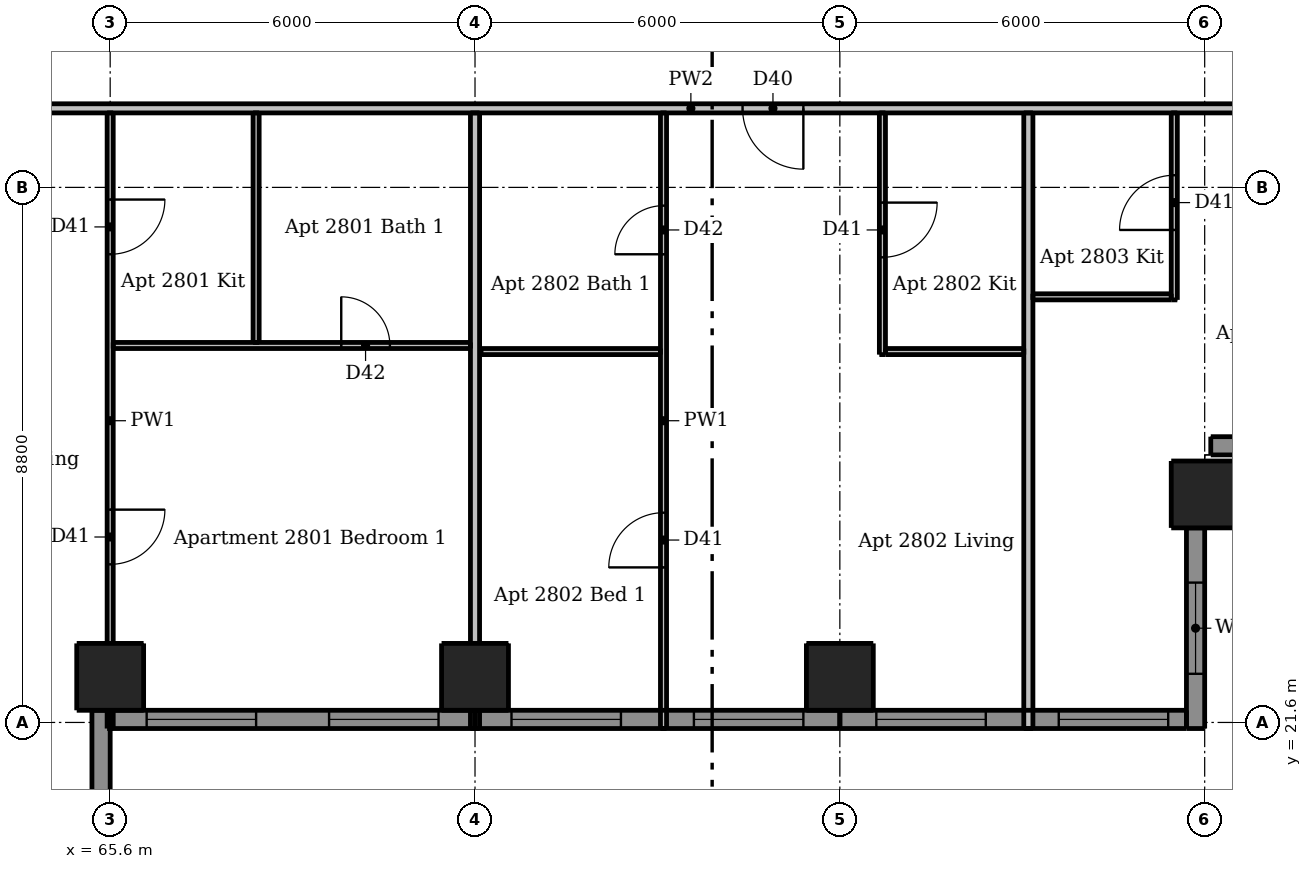
"""IFC4 building model, lengths in metres.
Left out: names, types, materials, properties, quantities, classifications, styles, units other than length and angle.
Written with IfcOpenShell. Run it as: python <this file> out.ifc"""

import sys

from ifc_helpers import new_model, si_unit, direction, frame, frame_2d, origin, origin_2d, place, context, subcontext, project, spatial, rectangle, extrude, element, fill, save


model = new_model("IFC4")
c1 = context("Model", 3, precision=1e-05, world=origin(), true_north=direction((0.0, 1.0)))
c2 = subcontext(c1, "Body", "Model", "MODEL_VIEW")
j1 = project(units=[si_unit("LENGTHUNIT", "METRE"), si_unit("PLANEANGLEUNIT", "RADIAN")], contexts=[c1])
p1 = place(None, origin())
s1 = spatial("IfcSite", under=j1, at=p1, CompositionType="ELEMENT")
p2 = place(p1, origin())
s2 = spatial("IfcBuilding", under=s1, at=p2, CompositionType="ELEMENT")
p3 = place(p2, frame((0.0, 0.0, 105.1)))
s3 = spatial("IfcBuildingStorey", under=s2, at=p3, CompositionType="ELEMENT", Elevation=105.1)
p4 = place(p3, frame((65.6, 22.35, 0.0), z_axis=(0.0, 0.0, 1.0), x_axis=(1.0, 0.0, 0.0)))
e1 = element("IfcColumn", 1, at=p4, inside=s3, PredefinedType="COLUMN", context=c2, shape_type="SweptSolid", body=[
    extrude(rectangle(XDim=1.1, YDim=1.1, at=origin_2d()), origin(), (0.0, 0.0, 1.0), 3.05),
])
for number, where, z_axis, x_axis in (
    (2, (71.6, 22.35, 0.0), (0.0, 0.0, 1.0), (1.0, 0.0, 0.0)),
    (3, (77.6, 22.35, 0.0), (0.0, 0.0, 1.0), (1.0, 0.0, 0.0)),
):
    element("IfcColumn", number, at=place(p3, frame(where, z_axis=z_axis, x_axis=x_axis)), inside=s3, PredefinedType="COLUMN", context=c2, shape_type="SweptSolid", body=[
        extrude(rectangle(XDim=1.1, YDim=1.1, at=origin_2d()), origin(), (0.0, 0.0, 1.0), 3.3),
    ])
p5 = place(p3, frame((83.6, 25.35, 0.0), z_axis=(0.0, 0.0, 1.0), x_axis=(1.0, 0.0, 0.0)))
e4 = element("IfcColumn", 4, at=p5, inside=s3, PredefinedType="COLUMN", context=c2, shape_type="SweptSolid", body=[
    extrude(rectangle(XDim=1.1, YDim=1.1, at=origin_2d()), origin(), (0.0, 0.0, 1.0), 3.05),
])
p6 = place(p3, frame((65.45, 20.0, 0.0), z_axis=(0.0, 0.0, 1.0), x_axis=(0.0, 1.0, 0.0)))
e5 = element("IfcWall", 5, at=p6, inside=s3, PredefinedType="SOLIDWALL", context=c2, shape_type="SweptSolid", body=[
    extrude(rectangle(XDim=1.8, YDim=0.3, at=frame_2d((0.9, 0.0))), origin(), (0.0, 0.0, 1.0), 3.05),
])
p7 = place(p3, frame((83.45, 21.5, 0.0), z_axis=(0.0, 0.0, 1.0), x_axis=(0.0, 1.0, 0.0)))
e6 = element("IfcWall", 6, at=p7, inside=s3, PredefinedType="SOLIDWALL", context=c2, shape_type="SweptSolid", body=[
    extrude(rectangle(XDim=3.3, YDim=0.3, at=frame_2d((1.65, 0.0))), origin(), (0.0, 0.0, 1.0), 3.05),
])
p8 = place(p7, frame((0.9, 0.0, 0.9)))
e7 = element("IfcOpeningElement", 7, at=p8, cuts=e6, PredefinedType="OPENING", context=c2, shape_type="SweptSolid", body=[
    extrude(rectangle(XDim=1.5, YDim=1.5, at=frame_2d((0.75, 0.75))), frame((0.0, 0.16, 0.0), z_axis=(0.0, -1.0, 0.0), x_axis=(1.0, 0.0, 0.0)), (0.0, 0.0, 1.0), 0.32),
])
p9 = place(p3, frame((65.6, 21.65, 0.0), z_axis=(0.0, 0.0, 1.0), x_axis=(1.0, 0.0, 0.0)))
e8 = element("IfcWall", 8, at=p9, inside=s3, PredefinedType="SOLIDWALL", context=c2, shape_type="SweptSolid", body=[
    extrude(rectangle(XDim=6.0, YDim=0.3, at=frame_2d((3.0, 0.0))), origin(), (0.0, 0.0, 1.0), 3.05),
])
p10 = place(p9, frame((0.6, 0.0, 0.15)))
e9 = element("IfcOpeningElement", 9, at=p10, cuts=e8, PredefinedType="OPENING", context=c2, shape_type="SweptSolid", body=[
    extrude(rectangle(XDim=1.8, YDim=2.1, at=frame_2d((0.9, 1.05))), frame((0.0, 0.16, 0.0), z_axis=(0.0, -1.0, 0.0), x_axis=(1.0, 0.0, 0.0)), (0.0, 0.0, 1.0), 0.32),
])
p11 = place(p9, frame((3.6, 0.0, 0.15)))
e10 = element("IfcOpeningElement", 10, at=p11, cuts=e8, PredefinedType="OPENING", context=c2, shape_type="SweptSolid", body=[
    extrude(rectangle(XDim=1.8, YDim=2.1, at=frame_2d((0.9, 1.05))), frame((0.0, 0.16, 0.0), z_axis=(0.0, -1.0, 0.0), x_axis=(1.0, 0.0, 0.0)), (0.0, 0.0, 1.0), 0.32),
])
p12 = place(p3, frame((71.6, 21.65, 0.0), z_axis=(0.0, 0.0, 1.0), x_axis=(1.0, 0.0, 0.0)))
e11 = element("IfcWall", 11, at=p12, inside=s3, PredefinedType="SOLIDWALL", context=c2, shape_type="SweptSolid", body=[
    extrude(rectangle(XDim=6.0, YDim=0.3, at=frame_2d((3.0, 0.0))), origin(), (0.0, 0.0, 1.0), 3.05),
])
p13 = place(p12, frame((0.6, 0.0, 0.15)))
e12 = element("IfcOpeningElement", 12, at=p13, cuts=e11, PredefinedType="OPENING", context=c2, shape_type="SweptSolid", body=[
    extrude(rectangle(XDim=1.8, YDim=2.1, at=frame_2d((0.9, 1.05))), frame((0.0, 0.16, 0.0), z_axis=(0.0, -1.0, 0.0), x_axis=(1.0, 0.0, 0.0)), (0.0, 0.0, 1.0), 0.32),
])
p14 = place(p12, frame((3.6, 0.0, 0.15)))
e13 = element("IfcOpeningElement", 13, at=p14, cuts=e11, PredefinedType="OPENING", context=c2, shape_type="SweptSolid", body=[
    extrude(rectangle(XDim=1.8, YDim=2.1, at=frame_2d((0.9, 1.05))), frame((0.0, 0.16, 0.0), z_axis=(0.0, -1.0, 0.0), x_axis=(1.0, 0.0, 0.0)), (0.0, 0.0, 1.0), 0.32),
])
p15 = place(p3, frame((77.6, 21.65, 0.0), z_axis=(0.0, 0.0, 1.0), x_axis=(1.0, 0.0, 0.0)))
e14 = element("IfcWall", 14, at=p15, inside=s3, PredefinedType="SOLIDWALL", context=c2, shape_type="SweptSolid", body=[
    extrude(rectangle(XDim=5.7, YDim=0.3, at=frame_2d((2.85, 0.0))), origin(), (0.0, 0.0, 1.0), 3.05),
])
p16 = place(p15, frame((0.6, 0.0, 0.15)))
e15 = element("IfcOpeningElement", 15, at=p16, cuts=e14, PredefinedType="OPENING", context=c2, shape_type="SweptSolid", body=[
    extrude(rectangle(XDim=1.8, YDim=2.1, at=frame_2d((0.9, 1.05))), frame((0.0, 0.16, 0.0), z_axis=(0.0, -1.0, 0.0), x_axis=(1.0, 0.0, 0.0)), (0.0, 0.0, 1.0), 0.32),
])
p17 = place(p15, frame((3.6, 0.0, 0.15)))
e16 = element("IfcOpeningElement", 16, at=p17, cuts=e14, PredefinedType="OPENING", context=c2, shape_type="SweptSolid", body=[
    extrude(rectangle(XDim=1.8, YDim=2.1, at=frame_2d((0.9, 1.05))), frame((0.0, 0.16, 0.0), z_axis=(0.0, -1.0, 0.0), x_axis=(1.0, 0.0, 0.0)), (0.0, 0.0, 1.0), 0.32),
])
p18 = place(p3, frame((83.7, 26.15, 0.0), z_axis=(0.0, 0.0, 1.0), x_axis=(1.0, 0.0, 0.0)))
e17 = element("IfcWall", 17, at=p18, inside=s3, PredefinedType="SOLIDWALL", context=c2, shape_type="SweptSolid", body=[
    extrude(rectangle(XDim=5.79, YDim=0.3, at=frame_2d((2.895, 0.0))), origin(), (0.0, 0.0, 1.0), 3.05),
])
p19 = place(p18, frame((0.5, 0.0, 0.15)))
e18 = element("IfcOpeningElement", 18, at=p19, cuts=e17, PredefinedType="OPENING", context=c2, shape_type="SweptSolid", body=[
    extrude(rectangle(XDim=1.8, YDim=2.1, at=frame_2d((0.9, 1.05))), frame((0.0, 0.16, 0.0), z_axis=(0.0, -1.0, 0.0), x_axis=(1.0, 0.0, 0.0)), (0.0, 0.0, 1.0), 0.32),
])
p20 = place(p18, frame((3.5, 0.0, 0.15)))
e19 = element("IfcOpeningElement", 19, at=p20, cuts=e17, PredefinedType="OPENING", context=c2, shape_type="SweptSolid", body=[
    extrude(rectangle(XDim=1.8, YDim=2.1, at=frame_2d((0.9, 1.05))), frame((0.0, 0.16, 0.0), z_axis=(0.0, -1.0, 0.0), x_axis=(1.0, 0.0, 0.0)), (0.0, 0.0, 1.0), 0.32),
])
p21 = place(p3, frame((65.6, 31.625, 0.0), z_axis=(0.0, 0.0, 1.0), x_axis=(0.0, -1.0, 0.0)))
e20 = element("IfcWall", 20, at=p21, inside=s3, PredefinedType="PARTITIONING", context=c2, shape_type="SweptSolid", body=[
    extrude(rectangle(XDim=10.125, YDim=0.1, at=frame_2d((5.062, 0.0))), origin(), (0.0, 0.0, 1.0), 2.516),
])
p22 = place(p21, frame((1.425, 0.0, 0.0)))
e21 = element("IfcOpeningElement", 21, at=p22, cuts=e20, PredefinedType="OPENING", context=c2, shape_type="SweptSolid", body=[
    extrude(rectangle(XDim=0.9, YDim=2.1, at=frame_2d((0.45, 1.05))), frame((0.0, 0.06, 0.0), z_axis=(0.0, -1.0, 0.0), x_axis=(1.0, 0.0, 0.0)), (0.0, 0.0, 1.0), 0.12),
])
p23 = place(p21, frame((6.525, 0.0, 0.0)))
e22 = element("IfcOpeningElement", 22, at=p23, cuts=e20, PredefinedType="OPENING", context=c2, shape_type="SweptSolid", body=[
    extrude(rectangle(XDim=0.9, YDim=2.1, at=frame_2d((0.45, 1.05))), frame((0.0, 0.06, 0.0), z_axis=(0.0, -1.0, 0.0), x_axis=(1.0, 0.0, 0.0)), (0.0, 0.0, 1.0), 0.12),
])
p24 = place(p3, frame((68.0, 27.85, 0.0), z_axis=(0.0, 0.0, 1.0), x_axis=(0.0, 1.0, 0.0)))
e23 = element("IfcWall", 23, at=p24, inside=s3, PredefinedType="PARTITIONING", context=c2, shape_type="SweptSolid", body=[
    extrude(rectangle(XDim=3.775, YDim=0.1, at=frame_2d((1.887, 0.0))), origin(), (0.0, 0.0, 1.0), 3.05),
])
p25 = place(p3, frame((74.7, 21.5, 0.0), z_axis=(0.0, 0.0, 1.0), x_axis=(0.0, 1.0, 0.0)))
e24 = element("IfcWall", 24, at=p25, inside=s3, PredefinedType="PARTITIONING", context=c2, shape_type="SweptSolid", body=[
    extrude(rectangle(XDim=10.125, YDim=0.1, at=frame_2d((5.062, 0.0))), origin(), (0.0, 0.0, 1.0), 3.05),
])
p26 = place(p25, frame((2.65, 0.0, 0.0)))
e25 = element("IfcOpeningElement", 25, at=p26, cuts=e24, PredefinedType="OPENING", context=c2, shape_type="SweptSolid", body=[
    extrude(rectangle(XDim=0.9, YDim=2.1, at=frame_2d((0.45, 1.05))), frame((0.0, 0.06, 0.0), z_axis=(0.0, -1.0, 0.0), x_axis=(1.0, 0.0, 0.0)), (0.0, 0.0, 1.0), 0.12),
])
p27 = place(p25, frame((7.8, 0.0, 0.0)))
e26 = element("IfcOpeningElement", 26, at=p27, cuts=e24, PredefinedType="OPENING", context=c2, shape_type="SweptSolid", body=[
    extrude(rectangle(XDim=0.8, YDim=2.1, at=frame_2d((0.4, 1.05))), frame((0.0, 0.06, 0.0), z_axis=(0.0, -1.0, 0.0), x_axis=(1.0, 0.0, 0.0)), (0.0, 0.0, 1.0), 0.12),
])
p28 = place(p3, frame((78.3, 31.625, 0.0), z_axis=(0.0, 0.0, 1.0), x_axis=(0.0, -1.0, 0.0)))
e27 = element("IfcWall", 27, at=p28, inside=s3, PredefinedType="PARTITIONING", context=c2, shape_type="SweptSolid", body=[
    extrude(rectangle(XDim=3.975, YDim=0.1, at=frame_2d((1.988, 0.0))), origin(), (0.0, 0.0, 1.0), 3.05),
])
p29 = place(p28, frame((1.475, 0.0, 0.0)))
e28 = element("IfcOpeningElement", 28, at=p29, cuts=e27, PredefinedType="OPENING", context=c2, shape_type="SweptSolid", body=[
    extrude(rectangle(XDim=0.9, YDim=2.1, at=frame_2d((0.45, 1.05))), frame((0.0, 0.06, 0.0), z_axis=(0.0, -1.0, 0.0), x_axis=(1.0, 0.0, 0.0)), (0.0, 0.0, 1.0), 0.12),
])
p30 = place(p3, frame((83.1, 28.55, 0.0), z_axis=(0.0, 0.0, 1.0), x_axis=(0.0, 1.0, 0.0)))
e29 = element("IfcWall", 29, at=p30, inside=s3, PredefinedType="PARTITIONING", context=c2, shape_type="SweptSolid", body=[
    extrude(rectangle(XDim=3.075, YDim=0.1, at=frame_2d((1.538, 0.0))), origin(), (0.0, 0.0, 1.0), 3.05),
])
p31 = place(p30, frame((1.15, 0.0, 0.0)))
e30 = element("IfcOpeningElement", 30, at=p31, cuts=e29, PredefinedType="OPENING", context=c2, shape_type="SweptSolid", body=[
    extrude(rectangle(XDim=0.9, YDim=2.1, at=frame_2d((0.45, 1.05))), frame((0.0, 0.06, 0.0), z_axis=(0.0, -1.0, 0.0), x_axis=(1.0, 0.0, 0.0)), (0.0, 0.0, 1.0), 0.12),
])
p32 = place(p3, frame((80.775, 28.6, 0.0), z_axis=(0.0, 0.0, 1.0), x_axis=(1.0, 0.0, 0.0)))
e31 = element("IfcWall", 31, at=p32, inside=s3, PredefinedType="PARTITIONING", context=c2, shape_type="SweptSolid", body=[
    extrude(rectangle(XDim=2.275, YDim=0.1, at=frame_2d((1.138, 0.0))), origin(), (0.0, 0.0, 1.0), 3.05),
])
p33 = place(p3, frame((65.65, 27.8, 0.0), z_axis=(0.0, 0.0, 1.0), x_axis=(1.0, 0.0, 0.0)))
e32 = element("IfcWall", 32, at=p33, inside=s3, PredefinedType="PARTITIONING", context=c2, shape_type="SweptSolid", body=[
    extrude(rectangle(XDim=5.875, YDim=0.1, at=frame_2d((2.938, 0.0))), origin(), (0.0, 0.0, 1.0), 3.05),
])
p34 = place(p33, frame((3.75, 0.0, 0.0)))
e33 = element("IfcOpeningElement", 33, at=p34, cuts=e32, PredefinedType="OPENING", context=c2, shape_type="SweptSolid", body=[
    extrude(rectangle(XDim=0.8, YDim=2.1, at=frame_2d((0.4, 1.05))), frame((0.0, 0.06, 0.0), z_axis=(0.0, -1.0, 0.0), x_axis=(1.0, 0.0, 0.0)), (0.0, 0.0, 1.0), 0.12),
])
p35 = place(p3, frame((71.7, 27.7, 0.0), z_axis=(0.0, 0.0, 1.0), x_axis=(1.0, 0.0, 0.0)))
e34 = element("IfcWall", 34, at=p35, inside=s3, PredefinedType="PARTITIONING", context=c2, shape_type="SweptSolid", body=[
    extrude(rectangle(XDim=2.95, YDim=0.1, at=frame_2d((1.475, 0.0))), origin(), (0.0, 0.0, 1.0), 3.05),
])
p36 = place(p3, frame((78.35, 27.7, 0.0), z_axis=(0.0, 0.0, 1.0), x_axis=(1.0, 0.0, 0.0)))
e35 = element("IfcWall", 35, at=p36, inside=s3, PredefinedType="PARTITIONING", context=c2, shape_type="SweptSolid", body=[
    extrude(rectangle(XDim=2.275, YDim=0.1, at=frame_2d((1.137, 0.0))), origin(), (0.0, 0.0, 1.0), 3.05),
])
p37 = place(p3, frame((71.6, 21.5, 0.0), z_axis=(0.0, 0.0, 1.0), x_axis=(0.0, 1.0, 0.0)))
e36 = element("IfcWall", 36, at=p37, inside=s3, PredefinedType="PARTITIONING", context=c2, shape_type="SweptSolid", body=[
    extrude(rectangle(XDim=10.125, YDim=0.15, at=frame_2d((5.062, 0.0))), origin(), (0.0, 0.0, 1.0), 2.516),
])
p38 = place(p3, frame((80.7, 21.5, 0.0), z_axis=(0.0, 0.0, 1.0), x_axis=(0.0, 1.0, 0.0)))
e37 = element("IfcWall", 37, at=p38, inside=s3, PredefinedType="PARTITIONING", context=c2, shape_type="SweptSolid", body=[
    extrude(rectangle(XDim=10.125, YDim=0.15, at=frame_2d((5.062, 0.0))), origin(), (0.0, 0.0, 1.0), 3.05),
])
p39 = place(p3, frame((89.525, 31.7, 0.0), z_axis=(0.0, 0.0, 1.0), x_axis=(-1.0, 0.0, 0.0)))
e38 = element("IfcWall", 38, at=p39, inside=s3, PredefinedType="PARTITIONING", context=c2, shape_type="SweptSolid", body=[
    extrude(rectangle(XDim=28.75, YDim=0.15, at=frame_2d((14.375, 0.0))), origin(), (0.0, 0.0, 1.0), 3.05),
])
p40 = place(p39, frame((25.875, 0.0, 0.0)))
e39 = element("IfcOpeningElement", 39, at=p40, cuts=e38, PredefinedType="OPENING", context=c2, shape_type="SweptSolid", body=[
    extrude(rectangle(XDim=1.0, YDim=2.1, at=frame_2d((0.5, 1.05))), frame((0.0, 0.085, 0.0), z_axis=(0.0, -1.0, 0.0), x_axis=(1.0, 0.0, 0.0)), (0.0, 0.0, 1.0), 0.17),
])
p41 = place(p39, frame((12.525, 0.0, 0.0)))
e40 = element("IfcOpeningElement", 40, at=p41, cuts=e38, PredefinedType="OPENING", context=c2, shape_type="SweptSolid", body=[
    extrude(rectangle(XDim=1.0, YDim=2.1, at=frame_2d((0.5, 1.05))), frame((0.0, 0.085, 0.0), z_axis=(0.0, -1.0, 0.0), x_axis=(1.0, 0.0, 0.0)), (0.0, 0.0, 1.0), 0.17),
])
p42 = place(p39, frame((4.175, 0.0, 0.0)))
e41 = element("IfcOpeningElement", 41, at=p42, cuts=e38, PredefinedType="OPENING", context=c2, shape_type="SweptSolid", body=[
    extrude(rectangle(XDim=1.0, YDim=2.1, at=frame_2d((0.5, 1.05))), frame((0.0, 0.085, 0.0), z_axis=(0.0, -1.0, 0.0), x_axis=(1.0, 0.0, 0.0)), (0.0, 0.0, 1.0), 0.17),
])
p43 = place(p8, origin())
e42 = element("IfcWindow", 42, at=p43, inside=s3, PartitioningType="DOUBLE_PANEL_VERTICAL", PredefinedType="WINDOW", context=c2, shape_type="SweptSolid", body=[
    extrude(rectangle(XDim=1.5, YDim=1.5, at=frame_2d((0.75, 0.75))), frame((0.0, 0.03, 0.0), z_axis=(0.0, -1.0, 0.0), x_axis=(1.0, 0.0, 0.0)), (0.0, 0.0, 1.0), 0.06),
])
fill(e7, e42)
p44 = place(p10, origin())
e43 = element("IfcWindow", 43, at=p44, inside=s3, PartitioningType="DOUBLE_PANEL_VERTICAL", PredefinedType="WINDOW", context=c2, shape_type="SweptSolid", body=[
    extrude(rectangle(XDim=1.8, YDim=2.1, at=frame_2d((0.9, 1.05))), frame((0.0, 0.03, 0.0), z_axis=(0.0, -1.0, 0.0), x_axis=(1.0, 0.0, 0.0)), (0.0, 0.0, 1.0), 0.06),
])
fill(e9, e43)
p45 = place(p11, origin())
e44 = element("IfcWindow", 44, at=p45, inside=s3, PartitioningType="DOUBLE_PANEL_VERTICAL", PredefinedType="WINDOW", context=c2, shape_type="SweptSolid", body=[
    extrude(rectangle(XDim=1.8, YDim=2.1, at=frame_2d((0.9, 1.05))), frame((0.0, 0.03, 0.0), z_axis=(0.0, -1.0, 0.0), x_axis=(1.0, 0.0, 0.0)), (0.0, 0.0, 1.0), 0.06),
])
fill(e10, e44)
p46 = place(p13, origin())
e45 = element("IfcWindow", 45, at=p46, inside=s3, PartitioningType="DOUBLE_PANEL_VERTICAL", PredefinedType="WINDOW", context=c2, shape_type="SweptSolid", body=[
    extrude(rectangle(XDim=1.8, YDim=2.1, at=frame_2d((0.9, 1.05))), frame((0.0, 0.03, 0.0), z_axis=(0.0, -1.0, 0.0), x_axis=(1.0, 0.0, 0.0)), (0.0, 0.0, 1.0), 0.06),
])
fill(e12, e45)
p47 = place(p14, origin())
e46 = element("IfcWindow", 46, at=p47, inside=s3, PartitioningType="DOUBLE_PANEL_VERTICAL", PredefinedType="WINDOW", context=c2, shape_type="SweptSolid", body=[
    extrude(rectangle(XDim=1.8, YDim=2.1, at=frame_2d((0.9, 1.05))), frame((0.0, 0.03, 0.0), z_axis=(0.0, -1.0, 0.0), x_axis=(1.0, 0.0, 0.0)), (0.0, 0.0, 1.0), 0.06),
])
fill(e13, e46)
p48 = place(p16, origin())
e47 = element("IfcWindow", 47, at=p48, inside=s3, PartitioningType="DOUBLE_PANEL_VERTICAL", PredefinedType="WINDOW", context=c2, shape_type="SweptSolid", body=[
    extrude(rectangle(XDim=1.8, YDim=2.1, at=frame_2d((0.9, 1.05))), frame((0.0, 0.03, 0.0), z_axis=(0.0, -1.0, 0.0), x_axis=(1.0, 0.0, 0.0)), (0.0, 0.0, 1.0), 0.06),
])
fill(e15, e47)
p49 = place(p17, origin())
e48 = element("IfcWindow", 48, at=p49, inside=s3, PartitioningType="DOUBLE_PANEL_VERTICAL", PredefinedType="WINDOW", context=c2, shape_type="SweptSolid", body=[
    extrude(rectangle(XDim=1.8, YDim=2.1, at=frame_2d((0.9, 1.05))), frame((0.0, 0.03, 0.0), z_axis=(0.0, -1.0, 0.0), x_axis=(1.0, 0.0, 0.0)), (0.0, 0.0, 1.0), 0.06),
])
fill(e16, e48)
p50 = place(p22, origin())
e49 = element("IfcDoor", 49, at=p50, inside=s3, OperationType="SINGLE_SWING_LEFT", PredefinedType="DOOR", context=c2, shape_type="SweptSolid", body=[
    extrude(rectangle(XDim=0.9, YDim=2.1, at=frame_2d((0.45, 1.05))), frame((0.0, 0.025, 0.0), z_axis=(0.0, -1.0, 0.0), x_axis=(1.0, 0.0, 0.0)), (0.0, 0.0, 1.0), 0.05),
])
fill(e21, e49)
p51 = place(p23, origin())
e50 = element("IfcDoor", 50, at=p51, inside=s3, OperationType="SINGLE_SWING_LEFT", PredefinedType="DOOR", context=c2, shape_type="SweptSolid", body=[
    extrude(rectangle(XDim=0.9, YDim=2.1, at=frame_2d((0.45, 1.05))), frame((0.0, 0.025, 0.0), z_axis=(0.0, -1.0, 0.0), x_axis=(1.0, 0.0, 0.0)), (0.0, 0.0, 1.0), 0.05),
])
fill(e22, e50)
p52 = place(p34, origin())
e51 = element("IfcDoor", 51, at=p52, inside=s3, OperationType="SINGLE_SWING_LEFT", PredefinedType="DOOR", context=c2, shape_type="SweptSolid", body=[
    extrude(rectangle(XDim=0.8, YDim=2.1, at=frame_2d((0.4, 1.05))), frame((0.0, 0.025, 0.0), z_axis=(0.0, -1.0, 0.0), x_axis=(1.0, 0.0, 0.0)), (0.0, 0.0, 1.0), 0.05),
])
fill(e33, e51)
p53 = place(p41, origin())
e52 = element("IfcDoor", 52, at=p53, inside=s3, OperationType="SINGLE_SWING_LEFT", PredefinedType="DOOR", context=c2, shape_type="SweptSolid", body=[
    extrude(rectangle(XDim=1.0, YDim=2.1, at=frame_2d((0.5, 1.05))), frame((0.0, 0.025, 0.0), z_axis=(0.0, -1.0, 0.0), x_axis=(1.0, 0.0, 0.0)), (0.0, 0.0, 1.0), 0.05),
])
fill(e40, e52)
p54 = place(p29, origin())
e53 = element("IfcDoor", 53, at=p54, inside=s3, OperationType="SINGLE_SWING_LEFT", PredefinedType="DOOR", context=c2, shape_type="SweptSolid", body=[
    extrude(rectangle(XDim=0.9, YDim=2.1, at=frame_2d((0.45, 1.05))), frame((0.0, 0.025, 0.0), z_axis=(0.0, -1.0, 0.0), x_axis=(1.0, 0.0, 0.0)), (0.0, 0.0, 1.0), 0.05),
])
fill(e28, e53)
p55 = place(p26, origin())
e54 = element("IfcDoor", 54, at=p55, inside=s3, OperationType="SINGLE_SWING_LEFT", PredefinedType="DOOR", context=c2, shape_type="SweptSolid", body=[
    extrude(rectangle(XDim=0.9, YDim=2.1, at=frame_2d((0.45, 1.05))), frame((0.0, 0.025, 0.0), z_axis=(0.0, -1.0, 0.0), x_axis=(1.0, 0.0, 0.0)), (0.0, 0.0, 1.0), 0.05),
])
fill(e25, e54)
p56 = place(p27, origin())
e55 = element("IfcDoor", 55, at=p56, inside=s3, OperationType="SINGLE_SWING_LEFT", PredefinedType="DOOR", context=c2, shape_type="SweptSolid", body=[
    extrude(rectangle(XDim=0.8, YDim=2.1, at=frame_2d((0.4, 1.05))), frame((0.0, 0.025, 0.0), z_axis=(0.0, -1.0, 0.0), x_axis=(1.0, 0.0, 0.0)), (0.0, 0.0, 1.0), 0.05),
])
fill(e26, e55)
p57 = place(p31, origin())
e56 = element("IfcDoor", 56, at=p57, inside=s3, OperationType="SINGLE_SWING_LEFT", PredefinedType="DOOR", context=c2, shape_type="SweptSolid", body=[
    extrude(rectangle(XDim=0.9, YDim=2.1, at=frame_2d((0.45, 1.05))), frame((0.0, 0.025, 0.0), z_axis=(0.0, -1.0, 0.0), x_axis=(1.0, 0.0, 0.0)), (0.0, 0.0, 1.0), 0.05),
])
fill(e30, e56)
save(model, sys.argv[1])
